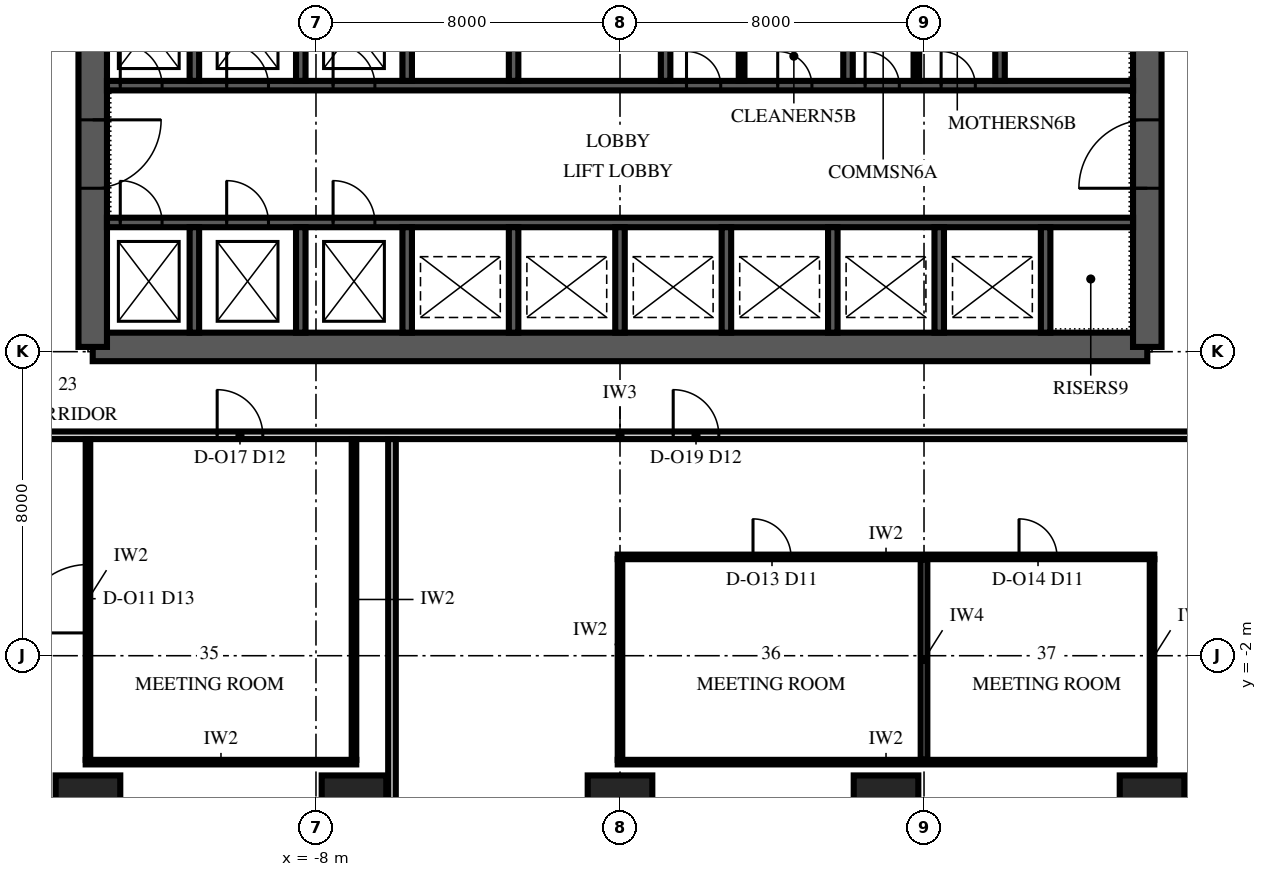
"""IFC4 building model, lengths in metres.
Left out: names, types, materials, properties, quantities, classifications, styles, units other than length and angle.
Written with IfcOpenShell. Run it as: python <this file> out.ifc"""

import sys

from ifc_helpers import new_model, si_unit, direction, frame, frame_2d, origin, origin_2d, place, context, subcontext, project, spatial, polyline, rectangle, outline, extrude, element, fill, save


model = new_model("IFC4")
c1 = context("Model", 3, precision=1e-05, world=origin(), true_north=direction((0.0, 1.0)))
c2 = subcontext(c1, "Body", "Model", "MODEL_VIEW")
j1 = project(units=[si_unit("LENGTHUNIT", "METRE"), si_unit("PLANEANGLEUNIT", "RADIAN")], contexts=[c1])
p1 = place(None, origin())
s1 = spatial("IfcSite", under=j1, at=p1, CompositionType="ELEMENT")
p2 = place(p1, origin())
s2 = spatial("IfcBuilding", under=s1, at=p2, CompositionType="ELEMENT")
p3 = place(p2, frame((0.0, 0.0, 103.0)))
s3 = spatial("IfcBuildingStorey", under=s2, at=p3, CompositionType="ELEMENT", Elevation=103.0)
for number, where, z_axis, x_axis in (
    (1, (-14.0, -6.0, 0.0), (0.0, 0.0, 1.0), (1.0, 0.0, 0.0)),
    (2, (-7.0, -6.0, 0.0), (0.0, 0.0, 1.0), (1.0, 0.0, 0.0)),
    (3, (0.0, -6.0, 0.0), (0.0, 0.0, 1.0), (1.0, 0.0, 0.0)),
    (4, (7.0, -6.0, 0.0), (0.0, 0.0, 1.0), (1.0, 0.0, 0.0)),
    (5, (14.0, -6.0, 0.0), (0.0, 0.0, 1.0), (1.0, 0.0, 0.0)),
):
    element("IfcColumn", number, at=place(p3, frame(where, z_axis=z_axis, x_axis=x_axis)), inside=s3, PredefinedType="COLUMN", context=c2, shape_type="SweptSolid", body=[
        extrude(rectangle(XDim=1.7, YDim=1.7, at=origin_2d()), origin(), (0.0, 0.0, 1.0), 4.0),
    ])
p4 = place(p3, frame((-13.875, 6.125, 0.0), z_axis=(0.0, 0.0, 1.0), x_axis=(1.0, 0.0, 0.0)))
e6 = element("IfcWall", 6, at=p4, inside=s3, PredefinedType="SHEAR", context=c2, shape_type="SweptSolid", body=[
    extrude(rectangle(XDim=27.75, YDim=0.75, at=frame_2d((13.875, 0.0))), origin(), (0.0, 0.0, 1.0), 4.0),
])
p5 = place(p3, frame((13.875, 6.125, 0.0), z_axis=(0.0, 0.0, 1.0), x_axis=(0.0, 1.0, 0.0)))
e7 = element("IfcWall", 7, at=p5, inside=s3, PredefinedType="SHEAR", context=c2, shape_type="SweptSolid", body=[
    extrude(outline(polyline([(0.0, -0.375), (17.75, -0.375), (17.75, 0.0), (17.375, 0.0), (17.375, 0.375), (0.375, 0.375), (0.375, 0.0), (0.0, 0.0), (0.0, -0.375)])), origin(), (0.0, 0.0, 1.0), 4.0),
])
p6 = place(p5, frame((4.175, 0.0, 0.0)))
e8 = element("IfcOpeningElement", 8, at=p6, cuts=e7, PredefinedType="OPENING", context=c2, shape_type="SweptSolid", body=[
    extrude(rectangle(XDim=1.8, YDim=2.4, at=frame_2d((0.9, 1.2))), frame((0.0, 0.39, 0.0), z_axis=(0.0, -1.0, 0.0), x_axis=(1.0, 0.0, 0.0)), (0.0, 0.0, 1.0), 0.78),
])
p7 = place(p3, frame((-13.875, 23.875, 0.0), z_axis=(0.0, 0.0, 1.0), x_axis=(0.0, -1.0, 0.0)))
e9 = element("IfcWall", 9, at=p7, inside=s3, PredefinedType="SHEAR", context=c2, shape_type="SweptSolid", body=[
    extrude(outline(polyline([(0.0, -0.375), (17.75, -0.375), (17.75, 0.0), (17.375, 0.0), (17.375, 0.375), (0.375, 0.375), (0.375, 0.0), (0.0, 0.0), (0.0, -0.375)])), origin(), (0.0, 0.0, 1.0), 4.0),
])
p8 = place(p7, frame((11.775, 0.0, 0.0)))
e10 = element("IfcOpeningElement", 10, at=p8, cuts=e9, PredefinedType="OPENING", context=c2, shape_type="SweptSolid", body=[
    extrude(rectangle(XDim=1.8, YDim=2.4, at=frame_2d((0.9, 1.2))), frame((0.0, 0.39, 0.0), z_axis=(0.0, -1.0, 0.0), x_axis=(1.0, 0.0, 0.0)), (0.0, 0.0, 1.0), 0.78),
])
p9 = place(p3, frame((-13.5, 9.4, 0.0), z_axis=(0.0, 0.0, 1.0), x_axis=(1.0, 0.0, 0.0)))
e11 = element("IfcWall", 11, at=p9, inside=s3, PredefinedType="SHEAR", context=c2, shape_type="SweptSolid", body=[
    extrude(rectangle(XDim=27.0, YDim=0.25, at=frame_2d((13.5, 0.0))), origin(), (0.0, 0.0, 1.0), 4.0),
])
p10 = place(p9, frame((0.35, 0.0, 0.0)))
e12 = element("IfcOpeningElement", 12, at=p10, cuts=e11, PredefinedType="OPENING", context=c2, shape_type="SweptSolid", body=[
    extrude(rectangle(XDim=1.1, YDim=2.1, at=frame_2d((0.55, 1.05))), frame((0.0, 0.14, 0.0), z_axis=(0.0, -1.0, 0.0), x_axis=(1.0, 0.0, 0.0)), (0.0, 0.0, 1.0), 0.28),
])
p11 = place(p9, frame((3.15, 0.0, 0.0)))
e13 = element("IfcOpeningElement", 13, at=p11, cuts=e11, PredefinedType="OPENING", context=c2, shape_type="SweptSolid", body=[
    extrude(rectangle(XDim=1.1, YDim=2.1, at=frame_2d((0.55, 1.05))), frame((0.0, 0.14, 0.0), z_axis=(0.0, -1.0, 0.0), x_axis=(1.0, 0.0, 0.0)), (0.0, 0.0, 1.0), 0.28),
])
p12 = place(p9, frame((5.95, 0.0, 0.0)))
e14 = element("IfcOpeningElement", 14, at=p12, cuts=e11, PredefinedType="OPENING", context=c2, shape_type="SweptSolid", body=[
    extrude(rectangle(XDim=1.1, YDim=2.1, at=frame_2d((0.55, 1.05))), frame((0.0, 0.14, 0.0), z_axis=(0.0, -1.0, 0.0), x_axis=(1.0, 0.0, 0.0)), (0.0, 0.0, 1.0), 0.28),
])
p13 = place(p3, frame((-13.5, 13.0, 0.0), z_axis=(0.0, 0.0, 1.0), x_axis=(1.0, 0.0, 0.0)))
e15 = element("IfcWall", 15, at=p13, inside=s3, PredefinedType="SHEAR", context=c2, shape_type="SweptSolid", body=[
    extrude(rectangle(XDim=27.0, YDim=0.25, at=frame_2d((13.5, 0.0))), origin(), (0.0, 0.0, 1.0), 4.0),
])
p14 = place(p13, frame((0.35, 0.0, 0.0)))
e16 = element("IfcOpeningElement", 16, at=p14, cuts=e15, PredefinedType="OPENING", context=c2, shape_type="SweptSolid", body=[
    extrude(rectangle(XDim=1.1, YDim=2.1, at=frame_2d((0.55, 1.05))), frame((0.0, 0.14, 0.0), z_axis=(0.0, -1.0, 0.0), x_axis=(1.0, 0.0, 0.0)), (0.0, 0.0, 1.0), 0.28),
])
p15 = place(p13, frame((3.15, 0.0, 0.0)))
e17 = element("IfcOpeningElement", 17, at=p15, cuts=e15, PredefinedType="OPENING", context=c2, shape_type="SweptSolid", body=[
    extrude(rectangle(XDim=1.1, YDim=2.1, at=frame_2d((0.55, 1.05))), frame((0.0, 0.14, 0.0), z_axis=(0.0, -1.0, 0.0), x_axis=(1.0, 0.0, 0.0)), (0.0, 0.0, 1.0), 0.28),
])
p16 = place(p13, frame((5.95, 0.0, 0.0)))
e18 = element("IfcOpeningElement", 18, at=p16, cuts=e15, PredefinedType="OPENING", context=c2, shape_type="SweptSolid", body=[
    extrude(rectangle(XDim=1.1, YDim=2.1, at=frame_2d((0.55, 1.05))), frame((0.0, 0.14, 0.0), z_axis=(0.0, -1.0, 0.0), x_axis=(1.0, 0.0, 0.0)), (0.0, 0.0, 1.0), 0.28),
])
p17 = place(p13, frame((15.25, 0.0, 0.0)))
e19 = element("IfcOpeningElement", 19, at=p17, cuts=e15, PredefinedType="OPENING", context=c2, shape_type="SweptSolid", body=[
    extrude(rectangle(XDim=0.9, YDim=2.1, at=frame_2d((0.45, 1.05))), frame((0.0, 0.14, 0.0), z_axis=(0.0, -1.0, 0.0), x_axis=(1.0, 0.0, 0.0)), (0.0, 0.0, 1.0), 0.28),
])
p18 = place(p13, frame((17.65, 0.0, 0.0)))
e20 = element("IfcOpeningElement", 20, at=p18, cuts=e15, PredefinedType="OPENING", context=c2, shape_type="SweptSolid", body=[
    extrude(rectangle(XDim=0.9, YDim=2.1, at=frame_2d((0.45, 1.05))), frame((0.0, 0.14, 0.0), z_axis=(0.0, -1.0, 0.0), x_axis=(1.0, 0.0, 0.0)), (0.0, 0.0, 1.0), 0.28),
])
p19 = place(p13, frame((19.95, 0.0, 0.0)))
e21 = element("IfcOpeningElement", 21, at=p19, cuts=e15, PredefinedType="OPENING", context=c2, shape_type="SweptSolid", body=[
    extrude(rectangle(XDim=0.9, YDim=2.1, at=frame_2d((0.45, 1.05))), frame((0.0, 0.14, 0.0), z_axis=(0.0, -1.0, 0.0), x_axis=(1.0, 0.0, 0.0)), (0.0, 0.0, 1.0), 0.28),
])
p20 = place(p13, frame((21.95, 0.0, 0.0)))
e22 = element("IfcOpeningElement", 22, at=p20, cuts=e15, PredefinedType="OPENING", context=c2, shape_type="SweptSolid", body=[
    extrude(rectangle(XDim=0.9, YDim=2.1, at=frame_2d((0.45, 1.05))), frame((0.0, 0.14, 0.0), z_axis=(0.0, -1.0, 0.0), x_axis=(1.0, 0.0, 0.0)), (0.0, 0.0, 1.0), 0.28),
])
for number, where, z_axis, x_axis in (
    (23, (-11.2, 6.5, 0.0), (0.0, 0.0, 1.0), (0.0, 1.0, 0.0)),
    (24, (-8.4, 6.5, 0.0), (0.0, 0.0, 1.0), (0.0, 1.0, 0.0)),
    (25, (-5.6, 6.5, 0.0), (0.0, 0.0, 1.0), (0.0, 1.0, 0.0)),
    (26, (-2.8, 6.5, 0.0), (0.0, 0.0, 1.0), (0.0, 1.0, 0.0)),
    (27, (0.0, 6.5, 0.0), (0.0, 0.0, 1.0), (0.0, 1.0, 0.0)),
    (28, (2.8, 6.5, 0.0), (0.0, 0.0, 1.0), (0.0, 1.0, 0.0)),
    (29, (5.6, 6.5, 0.0), (0.0, 0.0, 1.0), (0.0, 1.0, 0.0)),
    (30, (8.4, 6.5, 0.0), (0.0, 0.0, 1.0), (0.0, 1.0, 0.0)),
    (31, (11.2, 6.5, 0.0), (0.0, 0.0, 1.0), (0.0, 1.0, 0.0)),
):
    element("IfcWall", number, at=place(p3, frame(where, z_axis=z_axis, x_axis=x_axis)), inside=s3, PredefinedType="SHEAR", context=c2, shape_type="SweptSolid", body=[
        extrude(rectangle(XDim=2.775, YDim=0.25, at=frame_2d((1.387, 0.0))), origin(), (0.0, 0.0, 1.0), 4.0),
    ])
for number, where, z_axis, x_axis in (
    (32, (-11.2, 13.125, 0.0), (0.0, 0.0, 1.0), (0.0, 1.0, 0.0)),
    (33, (-8.4, 13.125, 0.0), (0.0, 0.0, 1.0), (0.0, 1.0, 0.0)),
    (34, (-5.6, 13.125, 0.0), (0.0, 0.0, 1.0), (0.0, 1.0, 0.0)),
    (35, (-2.8, 13.125, 0.0), (0.0, 0.0, 1.0), (0.0, 1.0, 0.0)),
    (36, (1.2, 13.125, 0.0), (0.0, 0.0, 1.0), (0.0, 1.0, 0.0)),
    (37, (6.0, 13.125, 0.0), (0.0, 0.0, 1.0), (0.0, 1.0, 0.0)),
    (38, (10.0, 13.125, 0.0), (0.0, 0.0, 1.0), (0.0, 1.0, 0.0)),
):
    element("IfcWall", number, at=place(p3, frame(where, z_axis=z_axis, x_axis=x_axis)), inside=s3, PredefinedType="SHEAR", context=c2, shape_type="SweptSolid", body=[
        extrude(rectangle(XDim=2.75, YDim=0.25, at=frame_2d((1.375, 0.0))), origin(), (0.0, 0.0, 1.0), 4.0),
    ])
p21 = place(p3, frame((3.2, 13.125, 0.0), z_axis=(0.0, 0.0, 1.0), x_axis=(0.0, 1.0, 0.0)))
e39 = element("IfcWall", 39, at=p21, inside=s3, PredefinedType="PARTITIONING", context=c2, shape_type="SweptSolid", body=[
    extrude(rectangle(XDim=1.45, YDim=0.15, at=frame_2d((0.725, 0.0))), origin(), (0.0, 0.0, 1.0), 3.85),
])
p22 = place(p3, frame((7.8, 13.125, 0.0), z_axis=(0.0, 0.0, 1.0), x_axis=(0.0, 1.0, 0.0)))
e40 = element("IfcWall", 40, at=p22, inside=s3, PredefinedType="PARTITIONING", context=c2, shape_type="SweptSolid", body=[
    extrude(rectangle(XDim=2.75, YDim=0.15, at=frame_2d((1.375, 0.0))), origin(), (0.0, 0.0, 1.0), 3.85),
])
p23 = place(p3, frame((-14.06, -4.8, 0.0), z_axis=(0.0, 0.0, 1.0), x_axis=(1.0, 0.0, 0.0)))
e41 = element("IfcWall", 41, at=p23, inside=s3, PredefinedType="PARTITIONING", context=c2, shape_type="SweptSolid", body=[
    extrude(rectangle(XDim=7.12, YDim=0.12, at=frame_2d((3.56, 0.0))), origin(), (0.0, 0.0, 1.0), 3.25),
])
p24 = place(p3, frame((-0.06, -4.8, 0.0), z_axis=(0.0, 0.0, 1.0), x_axis=(1.0, 0.0, 0.0)))
e42 = element("IfcWall", 42, at=p24, inside=s3, PredefinedType="PARTITIONING", context=c2, shape_type="SweptSolid", body=[
    extrude(rectangle(XDim=14.12, YDim=0.12, at=frame_2d((7.06, 0.0))), origin(), (0.0, 0.0, 1.0), 3.25),
])
p25 = place(p3, frame((-0.06, 0.6, 0.0), z_axis=(0.0, 0.0, 1.0), x_axis=(1.0, 0.0, 0.0)))
e43 = element("IfcWall", 43, at=p25, inside=s3, PredefinedType="PARTITIONING", context=c2, shape_type="SweptSolid", body=[
    extrude(rectangle(XDim=14.12, YDim=0.12, at=frame_2d((7.06, 0.0))), origin(), (0.0, 0.0, 1.0), 3.25),
])
p26 = place(p25, frame((3.56, 0.0, 0.0)))
e44 = element("IfcOpeningElement", 44, at=p26, cuts=e43, PredefinedType="OPENING", context=c2, shape_type="SweptSolid", body=[
    extrude(rectangle(XDim=1.0, YDim=2.4, at=frame_2d((0.5, 1.2))), frame((0.0, 0.075, 0.0), z_axis=(0.0, -1.0, 0.0), x_axis=(1.0, 0.0, 0.0)), (0.0, 0.0, 1.0), 0.15),
])
p27 = place(p25, frame((10.56, 0.0, 0.0)))
e45 = element("IfcOpeningElement", 45, at=p27, cuts=e43, PredefinedType="OPENING", context=c2, shape_type="SweptSolid", body=[
    extrude(rectangle(XDim=1.0, YDim=2.4, at=frame_2d((0.5, 1.2))), frame((0.0, 0.075, 0.0), z_axis=(0.0, -1.0, 0.0), x_axis=(1.0, 0.0, 0.0)), (0.0, 0.0, 1.0), 0.15),
])
p28 = place(p3, frame((-16.3, 3.8, 0.0), z_axis=(0.0, 0.0, 1.0), x_axis=(1.0, 0.0, 0.0)))
e46 = element("IfcWall", 46, at=p28, inside=s3, PredefinedType="PARTITIONING", context=c2, shape_type="SweptSolid", body=[
    extrude(rectangle(XDim=32.6, YDim=0.2, at=frame_2d((16.3, 0.0))), origin(), (0.0, 0.0, 1.0), 3.25),
])
p29 = place(p28, frame((5.7, 0.0, 0.0)))
e47 = element("IfcOpeningElement", 47, at=p29, cuts=e46, PredefinedType="OPENING", context=c2, shape_type="SweptSolid", body=[
    extrude(rectangle(XDim=1.2, YDim=2.4, at=frame_2d((0.6, 1.2))), frame((0.0, 0.115, 0.0), z_axis=(0.0, -1.0, 0.0), x_axis=(1.0, 0.0, 0.0)), (0.0, 0.0, 1.0), 0.23),
])
p30 = place(p28, frame((17.7, 0.0, 0.0)))
e48 = element("IfcOpeningElement", 48, at=p30, cuts=e46, PredefinedType="OPENING", context=c2, shape_type="SweptSolid", body=[
    extrude(rectangle(XDim=1.2, YDim=2.4, at=frame_2d((0.6, 1.2))), frame((0.0, 0.115, 0.0), z_axis=(0.0, -1.0, 0.0), x_axis=(1.0, 0.0, 0.0)), (0.0, 0.0, 1.0), 0.23),
])
p31 = place(p3, frame((-14.0, -4.74, 0.0), z_axis=(0.0, 0.0, 1.0), x_axis=(0.0, 1.0, 0.0)))
e49 = element("IfcWall", 49, at=p31, inside=s3, PredefinedType="PARTITIONING", context=c2, shape_type="SweptSolid", body=[
    extrude(rectangle(XDim=8.44, YDim=0.12, at=frame_2d((4.22, 0.0))), origin(), (0.0, 0.0, 1.0), 3.25),
])
p32 = place(p31, frame((3.34, 0.0, 0.0)))
e50 = element("IfcOpeningElement", 50, at=p32, cuts=e49, PredefinedType="OPENING", context=c2, shape_type="SweptSolid", body=[
    extrude(rectangle(XDim=1.8, YDim=2.4, at=frame_2d((0.9, 1.2))), frame((0.0, 0.075, 0.0), z_axis=(0.0, -1.0, 0.0), x_axis=(1.0, 0.0, 0.0)), (0.0, 0.0, 1.0), 0.15),
])
p33 = place(p3, frame((-7.0, -4.74, 0.0), z_axis=(0.0, 0.0, 1.0), x_axis=(0.0, 1.0, 0.0)))
e51 = element("IfcWall", 51, at=p33, inside=s3, PredefinedType="PARTITIONING", context=c2, shape_type="SweptSolid", body=[
    extrude(rectangle(XDim=8.44, YDim=0.12, at=frame_2d((4.22, 0.0))), origin(), (0.0, 0.0, 1.0), 3.85),
])
p34 = place(p3, frame((-6.0, -16.275, 0.0), z_axis=(0.0, 0.0, 1.0), x_axis=(0.0, 1.0, 0.0)))
e52 = element("IfcWall", 52, at=p34, inside=s3, PredefinedType="PARTITIONING", context=c2, shape_type="SweptSolid", body=[
    extrude(rectangle(XDim=19.975, YDim=0.2, at=frame_2d((9.987, 0.0))), origin(), (0.0, 0.0, 1.0), 2.842),
])
p35 = place(p3, frame((0.0, -4.74, 0.0), z_axis=(0.0, 0.0, 1.0), x_axis=(0.0, 1.0, 0.0)))
e53 = element("IfcWall", 53, at=p35, inside=s3, PredefinedType="PARTITIONING", context=c2, shape_type="SweptSolid", body=[
    extrude(rectangle(XDim=5.28, YDim=0.12, at=frame_2d((2.64, 0.0))), origin(), (0.0, 0.0, 1.0), 3.85),
])
p36 = place(p3, frame((8.0, -4.74, 0.0), z_axis=(0.0, 0.0, 1.0), x_axis=(0.0, 1.0, 0.0)))
e54 = element("IfcWall", 54, at=p36, inside=s3, PredefinedType="PARTITIONING", context=c2, shape_type="SweptSolid", body=[
    extrude(rectangle(XDim=5.28, YDim=0.175, at=frame_2d((2.64, 0.0))), origin(), (0.0, 0.0, 1.0), 3.85),
])
p37 = place(p3, frame((14.0, -4.74, 0.0), z_axis=(0.0, 0.0, 1.0), x_axis=(0.0, 1.0, 0.0)))
e55 = element("IfcWall", 55, at=p37, inside=s3, PredefinedType="PARTITIONING", context=c2, shape_type="SweptSolid", body=[
    extrude(rectangle(XDim=5.28, YDim=0.12, at=frame_2d((2.64, 0.0))), origin(), (0.0, 0.0, 1.0), 3.25),
])
p38 = place(p6, origin())
e56 = element("IfcDoor", 56, at=p38, inside=s3, OperationType="DOUBLE_DOOR_SINGLE_SWING", PredefinedType="DOOR", context=c2, shape_type="SweptSolid", body=[
    extrude(rectangle(XDim=1.8, YDim=2.4, at=frame_2d((0.9, 1.2))), frame((0.0, 0.375, 0.0), z_axis=(0.0, -1.0, 0.0), x_axis=(1.0, 0.0, 0.0)), (0.0, 0.0, 1.0), 0.75),
])
fill(e8, e56)
p39 = place(p8, origin())
e57 = element("IfcDoor", 57, at=p39, inside=s3, OperationType="DOUBLE_DOOR_SINGLE_SWING", PredefinedType="DOOR", context=c2, shape_type="SweptSolid", body=[
    extrude(rectangle(XDim=1.8, YDim=2.4, at=frame_2d((0.9, 1.2))), frame((0.0, 0.375, 0.0), z_axis=(0.0, -1.0, 0.0), x_axis=(1.0, 0.0, 0.0)), (0.0, 0.0, 1.0), 0.75),
])
fill(e10, e57)
p40 = place(p10, origin())
e58 = element("IfcDoor", 58, at=p40, inside=s3, OperationType="SLIDING_TO_LEFT", PredefinedType="DOOR", context=c2, shape_type="SweptSolid", body=[
    extrude(rectangle(XDim=1.1, YDim=2.1, at=frame_2d((0.55, 1.05))), frame((0.0, 0.125, 0.0), z_axis=(0.0, -1.0, 0.0), x_axis=(1.0, 0.0, 0.0)), (0.0, 0.0, 1.0), 0.25),
])
fill(e12, e58)
p41 = place(p11, origin())
e59 = element("IfcDoor", 59, at=p41, inside=s3, OperationType="SLIDING_TO_LEFT", PredefinedType="DOOR", context=c2, shape_type="SweptSolid", body=[
    extrude(rectangle(XDim=1.1, YDim=2.1, at=frame_2d((0.55, 1.05))), frame((0.0, 0.125, 0.0), z_axis=(0.0, -1.0, 0.0), x_axis=(1.0, 0.0, 0.0)), (0.0, 0.0, 1.0), 0.25),
])
fill(e13, e59)
p42 = place(p12, origin())
e60 = element("IfcDoor", 60, at=p42, inside=s3, OperationType="SLIDING_TO_LEFT", PredefinedType="DOOR", context=c2, shape_type="SweptSolid", body=[
    extrude(rectangle(XDim=1.1, YDim=2.1, at=frame_2d((0.55, 1.05))), frame((0.0, 0.125, 0.0), z_axis=(0.0, -1.0, 0.0), x_axis=(1.0, 0.0, 0.0)), (0.0, 0.0, 1.0), 0.25),
])
fill(e14, e60)
p43 = place(p14, origin())
e61 = element("IfcDoor", 61, at=p43, inside=s3, OperationType="SLIDING_TO_LEFT", PredefinedType="DOOR", context=c2, shape_type="SweptSolid", body=[
    extrude(rectangle(XDim=1.1, YDim=2.1, at=frame_2d((0.55, 1.05))), frame((0.0, 0.125, 0.0), z_axis=(0.0, -1.0, 0.0), x_axis=(1.0, 0.0, 0.0)), (0.0, 0.0, 1.0), 0.25),
])
fill(e16, e61)
p44 = place(p15, origin())
e62 = element("IfcDoor", 62, at=p44, inside=s3, OperationType="SLIDING_TO_LEFT", PredefinedType="DOOR", context=c2, shape_type="SweptSolid", body=[
    extrude(rectangle(XDim=1.1, YDim=2.1, at=frame_2d((0.55, 1.05))), frame((0.0, 0.125, 0.0), z_axis=(0.0, -1.0, 0.0), x_axis=(1.0, 0.0, 0.0)), (0.0, 0.0, 1.0), 0.25),
])
fill(e17, e62)
p45 = place(p16, origin())
e63 = element("IfcDoor", 63, at=p45, inside=s3, OperationType="SLIDING_TO_LEFT", PredefinedType="DOOR", context=c2, shape_type="SweptSolid", body=[
    extrude(rectangle(XDim=1.1, YDim=2.1, at=frame_2d((0.55, 1.05))), frame((0.0, 0.125, 0.0), z_axis=(0.0, -1.0, 0.0), x_axis=(1.0, 0.0, 0.0)), (0.0, 0.0, 1.0), 0.25),
])
fill(e18, e63)
p46 = place(p17, origin())
e64 = element("IfcDoor", 64, at=p46, inside=s3, OperationType="SINGLE_SWING_LEFT", PredefinedType="DOOR", context=c2, shape_type="SweptSolid", body=[
    extrude(rectangle(XDim=0.9, YDim=2.1, at=frame_2d((0.45, 1.05))), frame((0.0, 0.125, 0.0), z_axis=(0.0, -1.0, 0.0), x_axis=(1.0, 0.0, 0.0)), (0.0, 0.0, 1.0), 0.25),
])
fill(e19, e64)
p47 = place(p18, origin())
e65 = element("IfcDoor", 65, at=p47, inside=s3, OperationType="SINGLE_SWING_LEFT", PredefinedType="DOOR", context=c2, shape_type="SweptSolid", body=[
    extrude(rectangle(XDim=0.9, YDim=2.1, at=frame_2d((0.45, 1.05))), frame((0.0, 0.125, 0.0), z_axis=(0.0, -1.0, 0.0), x_axis=(1.0, 0.0, 0.0)), (0.0, 0.0, 1.0), 0.25),
])
fill(e20, e65)
p48 = place(p19, origin())
e66 = element("IfcDoor", 66, at=p48, inside=s3, OperationType="SINGLE_SWING_LEFT", PredefinedType="DOOR", context=c2, shape_type="SweptSolid", body=[
    extrude(rectangle(XDim=0.9, YDim=2.1, at=frame_2d((0.45, 1.05))), frame((0.0, 0.125, 0.0), z_axis=(0.0, -1.0, 0.0), x_axis=(1.0, 0.0, 0.0)), (0.0, 0.0, 1.0), 0.25),
])
fill(e21, e66)
p49 = place(p20, origin())
e67 = element("IfcDoor", 67, at=p49, inside=s3, OperationType="SINGLE_SWING_LEFT", PredefinedType="DOOR", context=c2, shape_type="SweptSolid", body=[
    extrude(rectangle(XDim=0.9, YDim=2.1, at=frame_2d((0.45, 1.05))), frame((0.0, 0.125, 0.0), z_axis=(0.0, -1.0, 0.0), x_axis=(1.0, 0.0, 0.0)), (0.0, 0.0, 1.0), 0.25),
])
fill(e22, e67)
p50 = place(p32, origin())
e68 = element("IfcDoor", 68, at=p50, inside=s3, OperationType="DOUBLE_DOOR_SINGLE_SWING", PredefinedType="DOOR", context=c2, shape_type="SweptSolid", body=[
    extrude(rectangle(XDim=1.8, YDim=2.4, at=frame_2d((0.9, 1.2))), frame((0.0, 0.06, 0.0), z_axis=(0.0, -1.0, 0.0), x_axis=(1.0, 0.0, 0.0)), (0.0, 0.0, 1.0), 0.12),
])
fill(e50, e68)
p51 = place(p26, origin())
e69 = element("IfcDoor", 69, at=p51, inside=s3, OperationType="SINGLE_SWING_RIGHT", PredefinedType="DOOR", context=c2, shape_type="SweptSolid", body=[
    extrude(rectangle(XDim=1.0, YDim=2.4, at=frame_2d((0.5, 1.2))), frame((0.0, 0.06, 0.0), z_axis=(0.0, -1.0, 0.0), x_axis=(1.0, 0.0, 0.0)), (0.0, 0.0, 1.0), 0.12),
])
fill(e44, e69)
p52 = place(p27, origin())
e70 = element("IfcDoor", 70, at=p52, inside=s3, OperationType="SINGLE_SWING_RIGHT", PredefinedType="DOOR", context=c2, shape_type="SweptSolid", body=[
    extrude(rectangle(XDim=1.0, YDim=2.4, at=frame_2d((0.5, 1.2))), frame((0.0, 0.06, 0.0), z_axis=(0.0, -1.0, 0.0), x_axis=(1.0, 0.0, 0.0)), (0.0, 0.0, 1.0), 0.12),
])
fill(e45, e70)
p53 = place(p29, origin())
e71 = element("IfcDoor", 71, at=p53, inside=s3, OperationType="SINGLE_SWING_LEFT", PredefinedType="DOOR", context=c2, shape_type="SweptSolid", body=[
    extrude(rectangle(XDim=1.2, YDim=2.4, at=frame_2d((0.6, 1.2))), frame((0.0, 0.1, 0.0), z_axis=(0.0, -1.0, 0.0), x_axis=(1.0, 0.0, 0.0)), (0.0, 0.0, 1.0), 0.199),
])
fill(e47, e71)
p54 = place(p30, origin())
e72 = element("IfcDoor", 72, at=p54, inside=s3, OperationType="SINGLE_SWING_LEFT", PredefinedType="DOOR", context=c2, shape_type="SweptSolid", body=[
    extrude(rectangle(XDim=1.2, YDim=2.4, at=frame_2d((0.6, 1.2))), frame((0.0, 0.1, 0.0), z_axis=(0.0, -1.0, 0.0), x_axis=(1.0, 0.0, 0.0)), (0.0, 0.0, 1.0), 0.199),
])
fill(e48, e72)
save(model, sys.argv[1])
